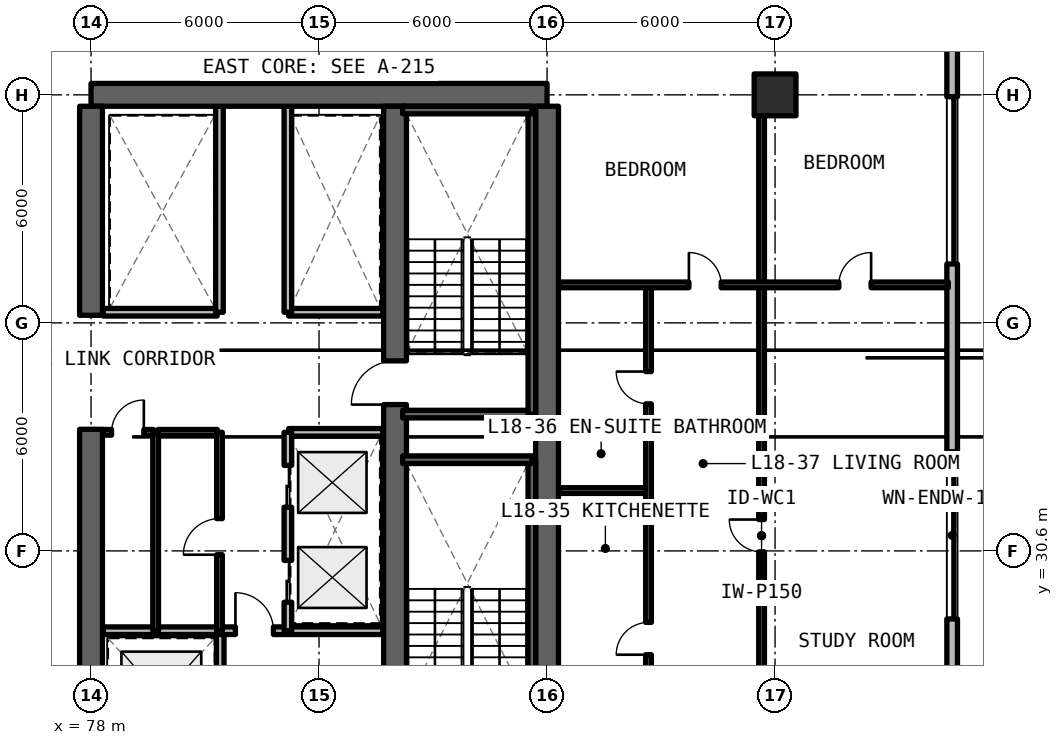
"""IFC4 building model, lengths in metres.
Left out: names, types, materials, properties, quantities, classifications, styles, units other than length and angle.
Written with IfcOpenShell. Run it as: python <this file> out.ifc"""

import sys

from ifc_helpers import new_model, si_unit, direction, frame, frame_2d, origin, origin_2d, place, context, subcontext, project, spatial, rectangle, extrude, element, fill, save


model = new_model("IFC4")
c1 = context("Model", 3, precision=1e-05, world=origin(), true_north=direction((0.0, 1.0)))
c2 = subcontext(c1, "Body", "Model", "MODEL_VIEW")
j1 = project(units=[si_unit("LENGTHUNIT", "METRE"), si_unit("PLANEANGLEUNIT", "RADIAN")], contexts=[c1])
p1 = place(None, origin())
s1 = spatial("IfcSite", under=j1, at=p1, CompositionType="ELEMENT")
p2 = place(p1, origin())
s2 = spatial("IfcBuilding", under=s1, at=p2, CompositionType="ELEMENT")
p3 = place(p2, frame((0.0, 0.0, 66.0)))
s3 = spatial("IfcBuildingStorey", under=s2, at=p3, CompositionType="ELEMENT", Elevation=66.0)
p4 = place(p3, frame((90.0, 42.6, 0.0), z_axis=(0.0, 0.0, 1.0), x_axis=(-1.0, 0.0, 0.0)))
e1 = element("IfcWall", 1, at=p4, inside=s3, PredefinedType="SHEAR", context=c2, shape_type="SweptSolid", body=[
    extrude(rectangle(XDim=12.0, YDim=0.6, at=frame_2d((6.0, 0.0))), origin(), (0.0, 0.0, 1.0), 3.63),
])
p5 = place(p3, frame((90.0, 24.9, 0.0), z_axis=(0.0, 0.0, 1.0), x_axis=(0.0, 1.0, 0.0)))
e2 = element("IfcWall", 2, at=p5, inside=s3, PredefinedType="SHEAR", context=c2, shape_type="SweptSolid", body=[
    extrude(rectangle(XDim=17.4, YDim=0.6, at=frame_2d((8.7, 0.0))), origin(), (0.0, 0.0, 1.0), 3.63),
])
p6 = place(p3, frame((78.0, 24.9, 0.0), z_axis=(0.0, 0.0, 1.0), x_axis=(0.0, 1.0, 0.0)))
e3 = element("IfcWall", 3, at=p6, inside=s3, PredefinedType="SHEAR", context=c2, shape_type="SweptSolid", body=[
    extrude(rectangle(XDim=8.9, YDim=0.6, at=frame_2d((4.45, 0.0))), origin(), (0.0, 0.0, 1.0), 3.63),
])
p7 = place(p3, frame((78.0, 36.8, 0.0), z_axis=(0.0, 0.0, 1.0), x_axis=(0.0, 1.0, 0.0)))
e4 = element("IfcWall", 4, at=p7, inside=s3, PredefinedType="SHEAR", context=c2, shape_type="SweptSolid", body=[
    extrude(rectangle(XDim=5.5, YDim=0.6, at=frame_2d((2.75, 0.0))), origin(), (0.0, 0.0, 1.0), 3.63),
])
p8 = place(p3, frame((86.0, 24.9, 0.0), z_axis=(0.0, 0.0, 1.0), x_axis=(0.0, 1.0, 0.0)))
e5 = element("IfcWall", 5, at=p8, inside=s3, PredefinedType="SHEAR", context=c2, shape_type="SweptSolid", body=[
    extrude(rectangle(XDim=17.4, YDim=0.6, at=frame_2d((8.7, 0.0))), origin(), (0.0, 0.0, 1.0), 3.63),
])
p9 = place(p8, frame((0.35, 0.0, 0.0)))
e6 = element("IfcOpeningElement", 6, at=p9, cuts=e5, PredefinedType="OPENING", context=c2, shape_type="SweptSolid", body=[
    extrude(rectangle(XDim=1.15, YDim=2.15, at=frame_2d((0.575, 1.075))), frame((0.0, 0.31, 0.0), z_axis=(0.0, -1.0, 0.0), x_axis=(1.0, 0.0, 0.0)), (0.0, 0.0, 1.0), 0.62),
])
p10 = place(p8, frame((9.55, 0.0, 0.0)))
e7 = element("IfcOpeningElement", 7, at=p10, cuts=e5, PredefinedType="OPENING", context=c2, shape_type="SweptSolid", body=[
    extrude(rectangle(XDim=1.15, YDim=2.15, at=frame_2d((0.575, 1.075))), frame((0.0, 0.31, 0.0), z_axis=(0.0, -1.0, 0.0), x_axis=(1.0, 0.0, 0.0)), (0.0, 0.0, 1.0), 0.62),
])
p11 = place(p3, frame((96.0, 42.6, 0.0), z_axis=(0.0, 0.0, 1.0), x_axis=(1.0, 0.0, 0.0)))
e8 = element("IfcColumn", 8, at=p11, inside=s3, PredefinedType="COLUMN", context=c2, shape_type="SweptSolid", body=[
    extrude(rectangle(XDim=1.1, YDim=1.1, at=origin_2d()), origin(), (0.0, 0.0, 1.0), 3.63),
])
p12 = place(p3, frame((100.66, 11.858, 0.0), z_axis=(0.0, 0.0, 1.0), x_axis=(0.0, 1.0, 0.0)))
e9 = element("IfcWall", 9, at=p12, inside=s3, PredefinedType="SOLIDWALL", context=c2, shape_type="SweptSolid", body=[
    extrude(rectangle(XDim=43.484, YDim=0.28, at=frame_2d((21.742, 0.0))), origin(), (0.0, 0.0, 1.0), 3.41),
])
p13 = place(p12, frame((3.442, 0.0, 0.0)))
e10 = element("IfcOpeningElement", 10, at=p13, cuts=e9, PredefinedType="OPENING", context=c2, shape_type="SweptSolid", body=[
    extrude(rectangle(XDim=1.1, YDim=2.15, at=frame_2d((0.55, 1.075))), frame((0.0, 0.15, 0.0), z_axis=(0.0, -1.0, 0.0), x_axis=(1.0, 0.0, 0.0)), (0.0, 0.0, 1.0), 0.3),
])
p14 = place(p12, frame((16.952, 0.0, 0.78)))
e11 = element("IfcOpeningElement", 11, at=p14, cuts=e9, PredefinedType="OPENING", context=c2, shape_type="SweptSolid", body=[
    extrude(rectangle(XDim=4.4, YDim=1.66, at=frame_2d((2.2, 0.83))), frame((0.0, 0.15, 0.0), z_axis=(0.0, -1.0, 0.0), x_axis=(1.0, 0.0, 0.0)), (0.0, 0.0, 1.0), 0.3),
])
p15 = place(p12, frame((26.292, 0.0, 0.78)))
e12 = element("IfcOpeningElement", 12, at=p15, cuts=e9, PredefinedType="OPENING", context=c2, shape_type="SweptSolid", body=[
    extrude(rectangle(XDim=4.4, YDim=1.66, at=frame_2d((2.2, 0.83))), frame((0.0, 0.15, 0.0), z_axis=(0.0, -1.0, 0.0), x_axis=(1.0, 0.0, 0.0)), (0.0, 0.0, 1.0), 0.3),
])
p16 = place(p3, frame((81.4, 24.92, 0.0), z_axis=(0.0, 0.0, 1.0), x_axis=(0.0, 1.0, 0.0)))
e13 = element("IfcWall", 13, at=p16, inside=s3, PredefinedType="SOLIDWALL", context=c2, shape_type="SweptSolid", body=[
    extrude(rectangle(XDim=3.58, YDim=0.2, at=frame_2d((1.79, 0.0))), origin(), (0.0, 0.0, 1.0), 2.63),
])
p17 = place(p16, frame((1.3, 0.0, 0.0)))
e14 = element("IfcOpeningElement", 14, at=p17, cuts=e13, PredefinedType="OPENING", context=c2, shape_type="SweptSolid", body=[
    extrude(rectangle(XDim=1.1, YDim=2.2, at=frame_2d((0.55, 1.1))), frame((0.0, 0.11, 0.0), z_axis=(0.0, -1.0, 0.0), x_axis=(1.0, 0.0, 0.0)), (0.0, 0.0, 1.0), 0.22),
])
p18 = place(p3, frame((78.32, 28.5, 0.0), z_axis=(0.0, 0.0, 1.0), x_axis=(1.0, 0.0, 0.0)))
e15 = element("IfcWall", 15, at=p18, inside=s3, PredefinedType="SOLIDWALL", context=c2, shape_type="SweptSolid", body=[
    extrude(rectangle(XDim=7.36, YDim=0.2, at=frame_2d((3.68, 0.0))), origin(), (0.0, 0.0, 1.0), 2.63),
])
p19 = place(p18, frame((3.48, 0.0, 0.0)))
e16 = element("IfcOpeningElement", 16, at=p19, cuts=e15, PredefinedType="OPENING", context=c2, shape_type="SweptSolid", body=[
    extrude(rectangle(XDim=1.0, YDim=2.15, at=frame_2d((0.5, 1.075))), frame((0.0, 0.11, 0.0), z_axis=(0.0, -1.0, 0.0), x_axis=(1.0, 0.0, 0.0)), (0.0, 0.0, 1.0), 0.22),
])
p20 = place(p3, frame((83.2, 33.72, 0.0), z_axis=(0.0, 0.0, 1.0), x_axis=(1.0, 0.0, 0.0)))
e17 = element("IfcWall", 17, at=p20, inside=s3, PredefinedType="SOLIDWALL", context=c2, shape_type="SweptSolid", body=[
    extrude(rectangle(XDim=2.48, YDim=0.2, at=frame_2d((1.24, 0.0))), origin(), (0.0, 0.0, 1.0), 2.63),
])
p21 = place(p3, frame((83.18, 28.5, 0.0), z_axis=(0.0, 0.0, 1.0), x_axis=(0.0, 1.0, 0.0)))
e18 = element("IfcWall", 18, at=p21, inside=s3, PredefinedType="SOLIDWALL", context=c2, shape_type="SweptSolid", body=[
    extrude(rectangle(XDim=5.22, YDim=0.2, at=frame_2d((2.61, 0.0))), origin(), (0.0, 0.0, 1.0), 2.63),
])
p22 = place(p21, frame((0.75, 0.0, 0.0)))
e19 = element("IfcOpeningElement", 19, at=p22, cuts=e18, PredefinedType="OPENING", context=c2, shape_type="SweptSolid", body=[
    extrude(rectangle(XDim=1.1, YDim=2.2, at=frame_2d((0.55, 1.1))), frame((0.0, 0.11, 0.0), z_axis=(0.0, -1.0, 0.0), x_axis=(1.0, 0.0, 0.0)), (0.0, 0.0, 1.0), 0.22),
])
p23 = place(p21, frame((3.25, 0.0, 0.0)))
e20 = element("IfcOpeningElement", 20, at=p23, cuts=e18, PredefinedType="OPENING", context=c2, shape_type="SweptSolid", body=[
    extrude(rectangle(XDim=1.1, YDim=2.2, at=frame_2d((0.55, 1.1))), frame((0.0, 0.11, 0.0), z_axis=(0.0, -1.0, 0.0), x_axis=(1.0, 0.0, 0.0)), (0.0, 0.0, 1.0), 0.22),
])
p24 = place(p3, frame((79.7, 28.5, 0.0), z_axis=(0.0, 0.0, 1.0), x_axis=(0.0, 1.0, 0.0)))
e21 = element("IfcWall", 21, at=p24, inside=s3, PredefinedType="SOLIDWALL", context=c2, shape_type="SweptSolid", body=[
    extrude(rectangle(XDim=5.22, YDim=0.15, at=frame_2d((2.61, 0.0))), origin(), (0.0, 0.0, 1.0), 2.63),
])
p25 = place(p3, frame((79.76, 33.72, 0.0), z_axis=(0.0, 0.0, 1.0), x_axis=(1.0, 0.0, 0.0)))
e22 = element("IfcWall", 22, at=p25, inside=s3, PredefinedType="SOLIDWALL", context=c2, shape_type="SweptSolid", body=[
    extrude(rectangle(XDim=1.56, YDim=0.15, at=frame_2d((0.78, 0.0))), origin(), (0.0, 0.0, 1.0), 2.63),
])
p26 = place(p3, frame((78.32, 33.72, 0.0), z_axis=(0.0, 0.0, 1.0), x_axis=(1.0, 0.0, 0.0)))
e23 = element("IfcWall", 23, at=p26, inside=s3, PredefinedType="SOLIDWALL", context=c2, shape_type="SweptSolid", body=[
    extrude(rectangle(XDim=1.32, YDim=0.15, at=frame_2d((0.66, 0.0))), origin(), (0.0, 0.0, 1.0), 2.63),
])
p27 = place(p26, frame((0.22, 0.0, 0.0)))
e24 = element("IfcOpeningElement", 24, at=p27, cuts=e23, PredefinedType="OPENING", context=c2, shape_type="SweptSolid", body=[
    extrude(rectangle(XDim=0.85, YDim=2.1, at=frame_2d((0.425, 1.05))), frame((0.0, 0.085, 0.0), z_axis=(0.0, -1.0, 0.0), x_axis=(1.0, 0.0, 0.0)), (0.0, 0.0, 1.0), 0.17),
])
p28 = place(p3, frame((81.38, 28.5, 0.0), z_axis=(0.0, 0.0, 1.0), x_axis=(0.0, 1.0, 0.0)))
e25 = element("IfcWall", 25, at=p28, inside=s3, PredefinedType="SOLIDWALL", context=c2, shape_type="SweptSolid", body=[
    extrude(rectangle(XDim=5.22, YDim=0.15, at=frame_2d((2.61, 0.0))), origin(), (0.0, 0.0, 1.0), 2.63),
])
p29 = place(p28, frame((2.0, 0.0, 0.0)))
e26 = element("IfcOpeningElement", 26, at=p29, cuts=e25, PredefinedType="OPENING", context=c2, shape_type="SweptSolid", body=[
    extrude(rectangle(XDim=0.95, YDim=2.15, at=frame_2d((0.475, 1.075))), frame((0.0, 0.085, 0.0), z_axis=(0.0, -1.0, 0.0), x_axis=(1.0, 0.0, 0.0)), (0.0, 0.0, 1.0), 0.17),
])
p30 = place(p3, frame((83.2, 36.88, 0.0), z_axis=(0.0, 0.0, 1.0), x_axis=(1.0, 0.0, 0.0)))
e27 = element("IfcWall", 27, at=p30, inside=s3, PredefinedType="SOLIDWALL", context=c2, shape_type="SweptSolid", body=[
    extrude(rectangle(XDim=2.48, YDim=0.2, at=frame_2d((1.24, 0.0))), origin(), (0.0, 0.0, 1.0), 2.63),
])
p31 = place(p3, frame((83.18, 36.88, 0.0), z_axis=(0.0, 0.0, 1.0), x_axis=(0.0, 1.0, 0.0)))
e28 = element("IfcWall", 28, at=p31, inside=s3, PredefinedType="SOLIDWALL", context=c2, shape_type="SweptSolid", body=[
    extrude(rectangle(XDim=5.42, YDim=0.2, at=frame_2d((2.71, 0.0))), origin(), (0.0, 0.0, 1.0), 2.63),
])
p32 = place(p3, frame((78.32, 36.88, 0.0), z_axis=(0.0, 0.0, 1.0), x_axis=(1.0, 0.0, 0.0)))
e29 = element("IfcWall", 29, at=p32, inside=s3, PredefinedType="SOLIDWALL", context=c2, shape_type="SweptSolid", body=[
    extrude(rectangle(XDim=3.0, YDim=0.2, at=frame_2d((1.5, 0.0))), origin(), (0.0, 0.0, 1.0), 2.63),
])
p33 = place(p3, frame((81.38, 36.88, 0.0), z_axis=(0.0, 0.0, 1.0), x_axis=(0.0, 1.0, 0.0)))
e30 = element("IfcWall", 30, at=p33, inside=s3, PredefinedType="SOLIDWALL", context=c2, shape_type="SweptSolid", body=[
    extrude(rectangle(XDim=5.42, YDim=0.2, at=frame_2d((2.71, 0.0))), origin(), (0.0, 0.0, 1.0), 2.63),
])
p34 = place(p3, frame((95.645, 24.4, 0.0), z_axis=(0.0, 0.0, 1.0), x_axis=(0.0, 1.0, 0.0)))
e31 = element("IfcWall", 31, at=p34, inside=s3, PredefinedType="PARTITIONING", context=c2, shape_type="SweptSolid", body=[
    extrude(rectangle(XDim=13.2, YDim=0.15, at=frame_2d((6.6, 0.0))), origin(), (0.0, 0.0, 1.0), 2.63),
])
p35 = place(p34, frame((6.175, 0.0, 0.0)))
e32 = element("IfcOpeningElement", 32, at=p35, cuts=e31, PredefinedType="OPENING", context=c2, shape_type="SweptSolid", body=[
    extrude(rectangle(XDim=0.85, YDim=2.1, at=frame_2d((0.425, 1.05))), frame((0.0, 0.085, 0.0), z_axis=(0.0, -1.0, 0.0), x_axis=(1.0, 0.0, 0.0)), (0.0, 0.0, 1.0), 0.17),
])
p36 = place(p3, frame((90.32, 32.188, 0.0), z_axis=(0.0, 0.0, 1.0), x_axis=(1.0, 0.0, 0.0)))
e33 = element("IfcWall", 33, at=p36, inside=s3, PredefinedType="PARTITIONING", context=c2, shape_type="SweptSolid", body=[
    extrude(rectangle(XDim=2.35, YDim=0.15, at=frame_2d((1.175, 0.0))), origin(), (0.0, 0.0, 1.0), 2.63),
])
p37 = place(p3, frame((92.67, 24.4, 0.0), z_axis=(0.0, 0.0, 1.0), x_axis=(0.0, 1.0, 0.0)))
e34 = element("IfcWall", 34, at=p37, inside=s3, PredefinedType="PARTITIONING", context=c2, shape_type="SweptSolid", body=[
    extrude(rectangle(XDim=13.2, YDim=0.15, at=frame_2d((6.6, 0.0))), origin(), (0.0, 0.0, 1.0), 2.63),
])
p38 = place(p37, frame((3.469, 0.0, 0.0)))
e35 = element("IfcOpeningElement", 35, at=p38, cuts=e34, PredefinedType="OPENING", context=c2, shape_type="SweptSolid", body=[
    extrude(rectangle(XDim=0.85, YDim=2.1, at=frame_2d((0.425, 1.05))), frame((0.0, 0.085, 0.0), z_axis=(0.0, -1.0, 0.0), x_axis=(1.0, 0.0, 0.0)), (0.0, 0.0, 1.0), 0.17),
])
p39 = place(p37, frame((10.069, 0.0, 0.0)))
e36 = element("IfcOpeningElement", 36, at=p39, cuts=e34, PredefinedType="OPENING", context=c2, shape_type="SweptSolid", body=[
    extrude(rectangle(XDim=0.85, YDim=2.1, at=frame_2d((0.425, 1.05))), frame((0.0, 0.085, 0.0), z_axis=(0.0, -1.0, 0.0), x_axis=(1.0, 0.0, 0.0)), (0.0, 0.0, 1.0), 0.17),
])
p40 = place(p3, frame((95.645, 37.6, 0.0), z_axis=(0.0, 0.0, 1.0), x_axis=(0.0, 1.0, 0.0)))
e37 = element("IfcWall", 37, at=p40, inside=s3, PredefinedType="PARTITIONING", context=c2, shape_type="SweptSolid", body=[
    extrude(rectangle(XDim=5.2, YDim=0.15, at=frame_2d((2.6, 0.0))), origin(), (0.0, 0.0, 1.0), 2.63),
])
p41 = place(p3, frame((90.32, 37.6, 0.0), z_axis=(0.0, 0.0, 1.0), x_axis=(1.0, 0.0, 0.0)))
e38 = element("IfcWall", 38, at=p41, inside=s3, PredefinedType="PARTITIONING", context=c2, shape_type="SweptSolid", body=[
    extrude(rectangle(XDim=10.24, YDim=0.15, at=frame_2d((5.12, 0.0))), origin(), (0.0, 0.0, 1.0), 2.63),
])
p42 = place(p41, frame((3.412, 0.0, 0.0)))
e39 = element("IfcOpeningElement", 39, at=p42, cuts=e38, PredefinedType="OPENING", context=c2, shape_type="SweptSolid", body=[
    extrude(rectangle(XDim=0.85, YDim=2.1, at=frame_2d((0.425, 1.05))), frame((0.0, 0.085, 0.0), z_axis=(0.0, -1.0, 0.0), x_axis=(1.0, 0.0, 0.0)), (0.0, 0.0, 1.0), 0.17),
])
p43 = place(p41, frame((7.357, 0.0, 0.0)))
e40 = element("IfcOpeningElement", 40, at=p43, cuts=e38, PredefinedType="OPENING", context=c2, shape_type="SweptSolid", body=[
    extrude(rectangle(XDim=0.85, YDim=2.1, at=frame_2d((0.425, 1.05))), frame((0.0, 0.085, 0.0), z_axis=(0.0, -1.0, 0.0), x_axis=(1.0, 0.0, 0.0)), (0.0, 0.0, 1.0), 0.17),
])
p44 = place(p3, frame((89.6, 25.0, 0.0), z_axis=(0.0, 0.0, 1.0), x_axis=(0.0, 1.0, 0.0)))
e41 = element("IfcWall", 41, at=p44, inside=s3, PredefinedType="SOLIDWALL", context=c2, shape_type="SweptSolid", body=[
    extrude(rectangle(XDim=8.0, YDim=0.2, at=frame_2d((4.0, 0.0))), origin(), (0.0, 0.0, 1.0), 3.63),
])
for number, where, z_axis, x_axis in (
    (42, (89.6, 33.0, 0.0), (0.0, 0.0, 1.0), (-1.0, 0.0, 0.0)),
    (43, (86.2, 34.2, 0.0), (0.0, 0.0, 1.0), (1.0, 0.0, 0.0)),
):
    element("IfcWall", number, at=place(p3, frame(where, z_axis=z_axis, x_axis=x_axis)), inside=s3, PredefinedType="SOLIDWALL", context=c2, shape_type="SweptSolid", body=[
        extrude(rectangle(XDim=3.4, YDim=0.2, at=frame_2d((1.7, 0.0))), origin(), (0.0, 0.0, 1.0), 3.63),
    ])
p45 = place(p3, frame((89.6, 34.2, 0.0), z_axis=(0.0, 0.0, 1.0), x_axis=(0.0, 1.0, 0.0)))
e44 = element("IfcWall", 44, at=p45, inside=s3, PredefinedType="SOLIDWALL", context=c2, shape_type="SweptSolid", body=[
    extrude(rectangle(XDim=8.0, YDim=0.2, at=frame_2d((4.0, 0.0))), origin(), (0.0, 0.0, 1.0), 3.63),
])
p46 = place(p3, frame((89.6, 42.2, 0.0), z_axis=(0.0, 0.0, 1.0), x_axis=(-1.0, 0.0, 0.0)))
e45 = element("IfcWall", 45, at=p46, inside=s3, PredefinedType="SOLIDWALL", context=c2, shape_type="SweptSolid", body=[
    extrude(rectangle(XDim=3.4, YDim=0.2, at=frame_2d((1.7, 0.0))), origin(), (0.0, 0.0, 1.0), 3.63),
])
p47 = place(p14, origin())
e46 = element("IfcWindow", 46, at=p47, inside=s3, PartitioningType="SINGLE_PANEL", PredefinedType="WINDOW", context=c2, shape_type="SweptSolid", body=[
    extrude(rectangle(XDim=4.4, YDim=1.66, at=frame_2d((2.2, 0.83))), frame((0.0, 0.03, 0.0), z_axis=(0.0, -1.0, 0.0), x_axis=(1.0, 0.0, 0.0)), (0.0, 0.0, 1.0), 0.06),
])
fill(e11, e46)
p48 = place(p15, origin())
e47 = element("IfcWindow", 47, at=p48, inside=s3, PartitioningType="SINGLE_PANEL", PredefinedType="WINDOW", context=c2, shape_type="SweptSolid", body=[
    extrude(rectangle(XDim=4.4, YDim=1.66, at=frame_2d((2.2, 0.83))), frame((0.0, 0.03, 0.0), z_axis=(0.0, -1.0, 0.0), x_axis=(1.0, 0.0, 0.0)), (0.0, 0.0, 1.0), 0.06),
])
fill(e12, e47)
p49 = place(p19, origin())
e48 = element("IfcDoor", 48, at=p49, inside=s3, OperationType="SINGLE_SWING_LEFT", PredefinedType="DOOR", context=c2, shape_type="SweptSolid", body=[
    extrude(rectangle(XDim=1.0, YDim=2.15, at=frame_2d((0.5, 1.075))), frame((0.0, 0.025, 0.0), z_axis=(0.0, -1.0, 0.0), x_axis=(1.0, 0.0, 0.0)), (0.0, 0.0, 1.0), 0.05),
])
fill(e16, e48)
p50 = place(p22, origin())
e49 = element("IfcDoor", 49, at=p50, inside=s3, OperationType="SLIDING_TO_LEFT", PredefinedType="DOOR", context=c2, shape_type="SweptSolid", body=[
    extrude(rectangle(XDim=1.1, YDim=2.2, at=frame_2d((0.55, 1.1))), frame((0.0, 0.025, 0.0), z_axis=(0.0, -1.0, 0.0), x_axis=(1.0, 0.0, 0.0)), (0.0, 0.0, 1.0), 0.05),
])
fill(e19, e49)
p51 = place(p23, origin())
e50 = element("IfcDoor", 50, at=p51, inside=s3, OperationType="SLIDING_TO_RIGHT", PredefinedType="DOOR", context=c2, shape_type="SweptSolid", body=[
    extrude(rectangle(XDim=1.1, YDim=2.2, at=frame_2d((0.55, 1.1))), frame((0.0, 0.025, 0.0), z_axis=(0.0, -1.0, 0.0), x_axis=(1.0, 0.0, 0.0)), (0.0, 0.0, 1.0), 0.05),
])
fill(e20, e50)
p52 = place(p27, origin())
e51 = element("IfcDoor", 51, at=p52, inside=s3, OperationType="SINGLE_SWING_RIGHT", PredefinedType="DOOR", context=c2, shape_type="SweptSolid", body=[
    extrude(rectangle(XDim=0.85, YDim=2.1, at=frame_2d((0.425, 1.05))), frame((0.0, 0.025, 0.0), z_axis=(0.0, -1.0, 0.0), x_axis=(1.0, 0.0, 0.0)), (0.0, 0.0, 1.0), 0.05),
])
fill(e24, e51)
p53 = place(p29, origin())
e52 = element("IfcDoor", 52, at=p53, inside=s3, OperationType="SINGLE_SWING_LEFT", PredefinedType="DOOR", context=c2, shape_type="SweptSolid", body=[
    extrude(rectangle(XDim=0.95, YDim=2.15, at=frame_2d((0.475, 1.075))), frame((0.0, 0.025, 0.0), z_axis=(0.0, -1.0, 0.0), x_axis=(1.0, 0.0, 0.0)), (0.0, 0.0, 1.0), 0.05),
])
fill(e26, e52)
p54 = place(p35, origin())
e53 = element("IfcDoor", 53, at=p54, inside=s3, OperationType="SINGLE_SWING_RIGHT", PredefinedType="DOOR", context=c2, shape_type="SweptSolid", body=[
    extrude(rectangle(XDim=0.85, YDim=2.1, at=frame_2d((0.425, 1.05))), frame((0.0, 0.025, 0.0), z_axis=(0.0, -1.0, 0.0), x_axis=(1.0, 0.0, 0.0)), (0.0, 0.0, 1.0), 0.05),
])
fill(e32, e53)
p55 = place(p38, origin())
e54 = element("IfcDoor", 54, at=p55, inside=s3, OperationType="SINGLE_SWING_LEFT", PredefinedType="DOOR", context=c2, shape_type="SweptSolid", body=[
    extrude(rectangle(XDim=0.85, YDim=2.1, at=frame_2d((0.425, 1.05))), frame((0.0, 0.025, 0.0), z_axis=(0.0, -1.0, 0.0), x_axis=(1.0, 0.0, 0.0)), (0.0, 0.0, 1.0), 0.05),
])
fill(e35, e54)
p56 = place(p39, origin())
e55 = element("IfcDoor", 55, at=p56, inside=s3, OperationType="SINGLE_SWING_RIGHT", PredefinedType="DOOR", context=c2, shape_type="SweptSolid", body=[
    extrude(rectangle(XDim=0.85, YDim=2.1, at=frame_2d((0.425, 1.05))), frame((0.0, 0.025, 0.0), z_axis=(0.0, -1.0, 0.0), x_axis=(1.0, 0.0, 0.0)), (0.0, 0.0, 1.0), 0.05),
])
fill(e36, e55)
p57 = place(p42, origin())
e56 = element("IfcDoor", 56, at=p57, inside=s3, OperationType="SINGLE_SWING_LEFT", PredefinedType="DOOR", context=c2, shape_type="SweptSolid", body=[
    extrude(rectangle(XDim=0.85, YDim=2.1, at=frame_2d((0.425, 1.05))), frame((0.0, 0.025, 0.0), z_axis=(0.0, -1.0, 0.0), x_axis=(1.0, 0.0, 0.0)), (0.0, 0.0, 1.0), 0.05),
])
fill(e39, e56)
p58 = place(p43, origin())
e57 = element("IfcDoor", 57, at=p58, inside=s3, OperationType="SINGLE_SWING_RIGHT", PredefinedType="DOOR", context=c2, shape_type="SweptSolid", body=[
    extrude(rectangle(XDim=0.85, YDim=2.1, at=frame_2d((0.425, 1.05))), frame((0.0, 0.025, 0.0), z_axis=(0.0, -1.0, 0.0), x_axis=(1.0, 0.0, 0.0)), (0.0, 0.0, 1.0), 0.05),
])
fill(e40, e57)
p59 = place(p10, origin())
e58 = element("IfcDoor", 58, at=p59, inside=s3, OperationType="SINGLE_SWING_LEFT", PredefinedType="DOOR", context=c2, shape_type="SweptSolid", body=[
    extrude(rectangle(XDim=1.15, YDim=2.15, at=frame_2d((0.575, 1.075))), frame((0.0, 0.025, 0.0), z_axis=(0.0, -1.0, 0.0), x_axis=(1.0, 0.0, 0.0)), (0.0, 0.0, 1.0), 0.05),
])
fill(e7, e58)
save(model, sys.argv[1])
